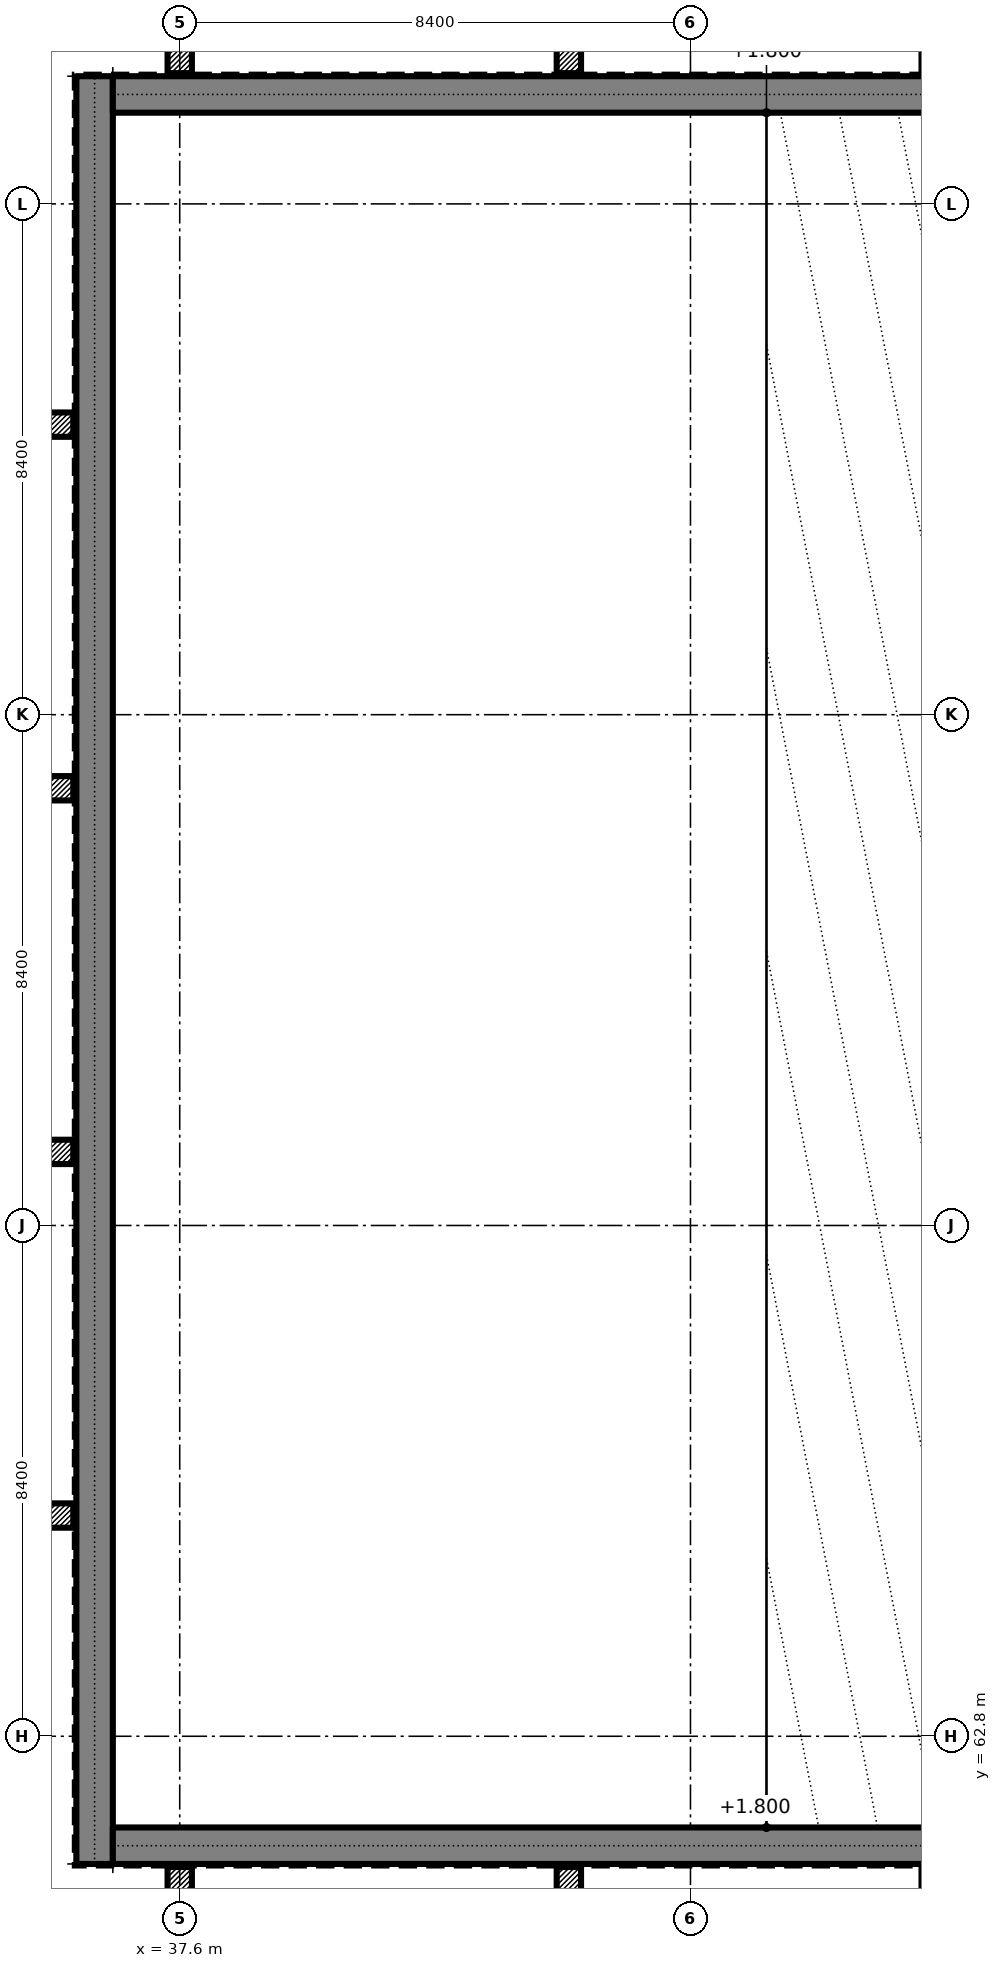
"""IFC4 building model, lengths in metres.
Left out: names, types, materials, properties, quantities, classifications, styles, units other than length and angle.
Written with IfcOpenShell. Run it as: python <this file> out.ifc"""

import sys

from ifc_helpers import new_model, si_unit, direction, frame, frame_2d, origin, origin_2d, place, context, subcontext, project, spatial, rectangle, extrude, element, save


model = new_model("IFC4")
c1 = context("Model", 3, precision=1e-05, world=origin(), true_north=direction((0.0, 1.0)))
c2 = subcontext(c1, "Body", "Model", "MODEL_VIEW")
j1 = project(units=[si_unit("LENGTHUNIT", "METRE"), si_unit("PLANEANGLEUNIT", "RADIAN")], contexts=[c1])
p1 = place(None, origin())
s1 = spatial("IfcSite", under=j1, at=p1, CompositionType="ELEMENT")
p2 = place(p1, origin())
s2 = spatial("IfcBuilding", under=s1, at=p2, CompositionType="ELEMENT")
p3 = place(p2, origin())
s3 = spatial("IfcBuildingStorey", under=s2, at=p3, CompositionType="ELEMENT", Elevation=0.0)
p4 = place(p3, frame((36.2, 60.7, 0.0), z_axis=(0.0, 0.0, 1.0), x_axis=(0.0, 1.0, 0.0)))
e1 = element("IfcWall", 1, at=p4, inside=s3, PredefinedType="SOLIDWALL", context=c2, shape_type="SweptSolid", body=[
    extrude(rectangle(XDim=29.4, YDim=0.6, at=frame_2d((14.7, 0.0))), origin(), (0.0, 0.0, 1.0), 5.4),
])
p5 = place(p3, frame((36.5, 61.0, 0.0), z_axis=(0.0, 0.0, 1.0), x_axis=(1.0, 0.0, 0.0)))
e2 = element("IfcWall", 2, at=p5, inside=s3, PredefinedType="SOLIDWALL", context=c2, shape_type="SweptSolid", body=[
    extrude(rectangle(XDim=52.6, YDim=0.6, at=frame_2d((26.3, 0.0))), origin(), (0.0, 0.0, 1.0), 5.4),
])
p6 = place(p5, frame((35.6, 0.0, 0.0)))
e3 = element("IfcOpeningElement", 3, at=p6, cuts=e2, PredefinedType="OPENING", context=c2, shape_type="SweptSolid", body=[
    extrude(rectangle(XDim=1.8, YDim=2.1, at=frame_2d((0.9, 1.05))), frame((0.0, 0.31, 0.0), z_axis=(0.0, -1.0, 0.0), x_axis=(1.0, 0.0, 0.0)), (0.0, 0.0, 1.0), 0.62),
])
p7 = place(p5, frame((39.6, 0.0, 0.0)))
e4 = element("IfcOpeningElement", 4, at=p7, cuts=e2, PredefinedType="OPENING", context=c2, shape_type="SweptSolid", body=[
    extrude(rectangle(XDim=1.8, YDim=2.1, at=frame_2d((0.9, 1.05))), frame((0.0, 0.31, 0.0), z_axis=(0.0, -1.0, 0.0), x_axis=(1.0, 0.0, 0.0)), (0.0, 0.0, 1.0), 0.62),
])
p8 = place(p3, frame((36.5, 89.8, 0.0), z_axis=(0.0, 0.0, 1.0), x_axis=(1.0, 0.0, 0.0)))
e5 = element("IfcWall", 5, at=p8, inside=s3, PredefinedType="SOLIDWALL", context=c2, shape_type="SweptSolid", body=[
    extrude(rectangle(XDim=52.6, YDim=0.6, at=frame_2d((26.3, 0.0))), origin(), (0.0, 0.0, 1.0), 5.4),
])
p9 = place(p8, frame((35.6, 0.0, 0.0)))
e6 = element("IfcOpeningElement", 6, at=p9, cuts=e5, PredefinedType="OPENING", context=c2, shape_type="SweptSolid", body=[
    extrude(rectangle(XDim=1.8, YDim=2.1, at=frame_2d((0.9, 1.05))), frame((0.0, 0.31, 0.0), z_axis=(0.0, -1.0, 0.0), x_axis=(1.0, 0.0, 0.0)), (0.0, 0.0, 1.0), 0.62),
])
p10 = place(p8, frame((39.6, 0.0, 0.0)))
e7 = element("IfcOpeningElement", 7, at=p10, cuts=e5, PredefinedType="OPENING", context=c2, shape_type="SweptSolid", body=[
    extrude(rectangle(XDim=1.8, YDim=2.1, at=frame_2d((0.9, 1.05))), frame((0.0, 0.31, 0.0), z_axis=(0.0, -1.0, 0.0), x_axis=(1.0, 0.0, 0.0)), (0.0, 0.0, 1.0), 0.62),
])
for number, where, z_axis, x_axis in (
    (8, (37.6, 60.45, 0.0), (0.0, 0.0, 1.0), (1.0, 0.0, 0.0)),
    (9, (44.0, 60.45, 0.0), (0.0, 0.0, 1.0), (1.0, 0.0, 0.0)),
    (10, (37.6, 90.35, 0.0), (0.0, 0.0, 1.0), (1.0, 0.0, 0.0)),
    (11, (44.0, 90.35, 0.0), (0.0, 0.0, 1.0), (1.0, 0.0, 0.0)),
    (12, (35.65, 66.43, 0.0), (0.0, 0.0, 1.0), (1.0, 0.0, 0.0)),
    (13, (35.65, 72.41, 0.0), (0.0, 0.0, 1.0), (1.0, 0.0, 0.0)),
    (14, (35.65, 78.39, 0.0), (0.0, 0.0, 1.0), (1.0, 0.0, 0.0)),
    (15, (35.65, 84.37, 0.0), (0.0, 0.0, 1.0), (1.0, 0.0, 0.0)),
):
    element("IfcColumn", number, at=place(p3, frame(where, z_axis=z_axis, x_axis=x_axis)), inside=s3, PredefinedType="COLUMN", context=c2, shape_type="SweptSolid", body=[
        extrude(rectangle(XDim=0.4, YDim=0.4, at=origin_2d()), origin(), (0.0, 0.0, 1.0), 5.4),
    ])
for number, where, z_axis, x_axis in (
    (16, (36.2, 65.01, -0.3), (0.0, 0.0, 1.0), (0.0, 1.0, 0.0)),
    (17, (36.2, 70.99, -0.3), (0.0, 0.0, 1.0), (0.0, 1.0, 0.0)),
    (18, (36.2, 76.97, -0.3), (0.0, 0.0, 1.0), (0.0, 1.0, 0.0)),
    (19, (36.2, 82.95, -0.3), (0.0, 0.0, 1.0), (0.0, 1.0, 0.0)),
):
    element("IfcWall", number, at=place(p3, frame(where, z_axis=z_axis, x_axis=x_axis)), inside=s3, PredefinedType="SOLIDWALL", context=c2, shape_type="SweptSolid", body=[
        extrude(rectangle(XDim=2.84, YDim=0.6, at=frame_2d((1.42, 0.0))), origin(), (0.0, 0.0, 1.0), 0.3),
    ])
for number, where, z_axis, x_axis in (
    (20, (36.2, 60.7, -0.3), (0.0, 0.0, 1.0), (0.0, 1.0, 0.0)),
    (21, (36.2, 88.83, -0.3), (0.0, 0.0, 1.0), (0.0, 1.0, 0.0)),
):
    element("IfcWall", number, at=place(p3, frame(where, z_axis=z_axis, x_axis=x_axis)), inside=s3, PredefinedType="SOLIDWALL", context=c2, shape_type="SweptSolid", body=[
        extrude(rectangle(XDim=1.27, YDim=0.6, at=frame_2d((0.635, 0.0))), origin(), (0.0, 0.0, 1.0), 0.3),
    ])
for number, where, z_axis, x_axis in (
    (22, (36.2, 61.97, -0.3), (0.0, 0.0, 1.0), (0.0, 1.0, 0.0)),
    (23, (36.2, 85.79, -0.3), (0.0, 0.0, 1.0), (0.0, 1.0, 0.0)),
):
    element("IfcWall", number, at=place(p3, frame(where, z_axis=z_axis, x_axis=x_axis)), inside=s3, PredefinedType="SOLIDWALL", context=c2, shape_type="SweptSolid", body=[
        extrude(rectangle(XDim=3.04, YDim=0.6, at=frame_2d((1.52, 0.0))), origin(), (0.0, 0.0, 1.0), 0.3),
    ])
for number, where, z_axis, x_axis in (
    (24, (36.2, 67.85, -0.3), (0.0, 0.0, 1.0), (0.0, 1.0, 0.0)),
    (25, (36.2, 73.83, -0.3), (0.0, 0.0, 1.0), (0.0, 1.0, 0.0)),
    (26, (36.2, 79.81, -0.3), (0.0, 0.0, 1.0), (0.0, 1.0, 0.0)),
):
    element("IfcWall", number, at=place(p3, frame(where, z_axis=z_axis, x_axis=x_axis)), inside=s3, PredefinedType="SOLIDWALL", context=c2, shape_type="SweptSolid", body=[
        extrude(rectangle(XDim=3.14, YDim=0.6, at=frame_2d((1.57, 0.0))), origin(), (0.0, 0.0, 1.0), 0.3),
    ])
p11 = place(p3, frame((36.5, 61.0, -0.3), z_axis=(0.0, 0.0, 1.0), x_axis=(1.0, 0.0, 0.0)))
e27 = element("IfcWall", 27, at=p11, inside=s3, PredefinedType="SOLIDWALL", context=c2, shape_type="SweptSolid", body=[
    extrude(rectangle(XDim=2.62, YDim=0.6, at=frame_2d((1.31, 0.0))), origin(), (0.0, 0.0, 1.0), 0.3),
])
for number, where, z_axis, x_axis in (
    (28, (42.48, 61.0, -0.3), (0.0, 0.0, 1.0), (1.0, 0.0, 0.0)),
    (29, (48.48, 61.0, -0.3), (0.0, 0.0, 1.0), (1.0, 0.0, 0.0)),
):
    element("IfcWall", number, at=place(p3, frame(where, z_axis=z_axis, x_axis=x_axis)), inside=s3, PredefinedType="SOLIDWALL", context=c2, shape_type="SweptSolid", body=[
        extrude(rectangle(XDim=3.04, YDim=0.6, at=frame_2d((1.52, 0.0))), origin(), (0.0, 0.0, 1.0), 0.3),
    ])
p12 = place(p3, frame((39.12, 61.0, -0.3), z_axis=(0.0, 0.0, 1.0), x_axis=(1.0, 0.0, 0.0)))
e30 = element("IfcWall", 30, at=p12, inside=s3, PredefinedType="SOLIDWALL", context=c2, shape_type="SweptSolid", body=[
    extrude(rectangle(XDim=3.36, YDim=0.6, at=frame_2d((1.68, 0.0))), origin(), (0.0, 0.0, 1.0), 0.3),
])
p13 = place(p3, frame((45.52, 61.0, -0.3), z_axis=(0.0, 0.0, 1.0), x_axis=(1.0, 0.0, 0.0)))
e31 = element("IfcWall", 31, at=p13, inside=s3, PredefinedType="SOLIDWALL", context=c2, shape_type="SweptSolid", body=[
    extrude(rectangle(XDim=2.96, YDim=0.6, at=frame_2d((1.48, 0.0))), origin(), (0.0, 0.0, 1.0), 0.3),
])
p14 = place(p3, frame((36.5, 89.8, -0.3), z_axis=(0.0, 0.0, 1.0), x_axis=(1.0, 0.0, 0.0)))
e32 = element("IfcWall", 32, at=p14, inside=s3, PredefinedType="SOLIDWALL", context=c2, shape_type="SweptSolid", body=[
    extrude(rectangle(XDim=2.62, YDim=0.6, at=frame_2d((1.31, 0.0))), origin(), (0.0, 0.0, 1.0), 0.3),
])
for number, where, z_axis, x_axis in (
    (33, (42.48, 89.8, -0.3), (0.0, 0.0, 1.0), (1.0, 0.0, 0.0)),
    (34, (48.48, 89.8, -0.3), (0.0, 0.0, 1.0), (1.0, 0.0, 0.0)),
):
    element("IfcWall", number, at=place(p3, frame(where, z_axis=z_axis, x_axis=x_axis)), inside=s3, PredefinedType="SOLIDWALL", context=c2, shape_type="SweptSolid", body=[
        extrude(rectangle(XDim=3.04, YDim=0.6, at=frame_2d((1.52, 0.0))), origin(), (0.0, 0.0, 1.0), 0.3),
    ])
p15 = place(p3, frame((39.12, 89.8, -0.3), z_axis=(0.0, 0.0, 1.0), x_axis=(1.0, 0.0, 0.0)))
e35 = element("IfcWall", 35, at=p15, inside=s3, PredefinedType="SOLIDWALL", context=c2, shape_type="SweptSolid", body=[
    extrude(rectangle(XDim=3.36, YDim=0.6, at=frame_2d((1.68, 0.0))), origin(), (0.0, 0.0, 1.0), 0.3),
])
p16 = place(p3, frame((45.52, 89.8, -0.3), z_axis=(0.0, 0.0, 1.0), x_axis=(1.0, 0.0, 0.0)))
e36 = element("IfcWall", 36, at=p16, inside=s3, PredefinedType="SOLIDWALL", context=c2, shape_type="SweptSolid", body=[
    extrude(rectangle(XDim=2.96, YDim=0.6, at=frame_2d((1.48, 0.0))), origin(), (0.0, 0.0, 1.0), 0.3),
])
for number, where, z_axis, x_axis in (
    (37, (47.25, 62.3, -0.3), (0.0, 0.0, 1.0), (1.0, 0.0, 0.0)),
    (38, (47.25, 66.043, -0.3), (0.0, 0.0, 1.0), (1.0, 0.0, 0.0)),
    (39, (47.25, 69.786, -0.3), (0.0, 0.0, 1.0), (1.0, 0.0, 0.0)),
    (40, (47.25, 73.529, -0.3), (0.0, 0.0, 1.0), (1.0, 0.0, 0.0)),
    (41, (47.25, 77.271, -0.3), (0.0, 0.0, 1.0), (1.0, 0.0, 0.0)),
    (42, (47.25, 81.014, -0.3), (0.0, 0.0, 1.0), (1.0, 0.0, 0.0)),
    (43, (47.25, 84.757, -0.3), (0.0, 0.0, 1.0), (1.0, 0.0, 0.0)),
    (44, (47.25, 88.5, -0.3), (0.0, 0.0, 1.0), (1.0, 0.0, 0.0)),
):
    element("IfcColumn", number, at=place(p3, frame(where, z_axis=z_axis, x_axis=x_axis)), inside=s3, PredefinedType="COLUMN", context=c2, shape_type="SweptSolid", body=[
        extrude(rectangle(XDim=0.7, YDim=0.7, at=origin_2d()), origin(), (0.0, 0.0, 1.0), 1.8),
    ])
save(model, sys.argv[1])
